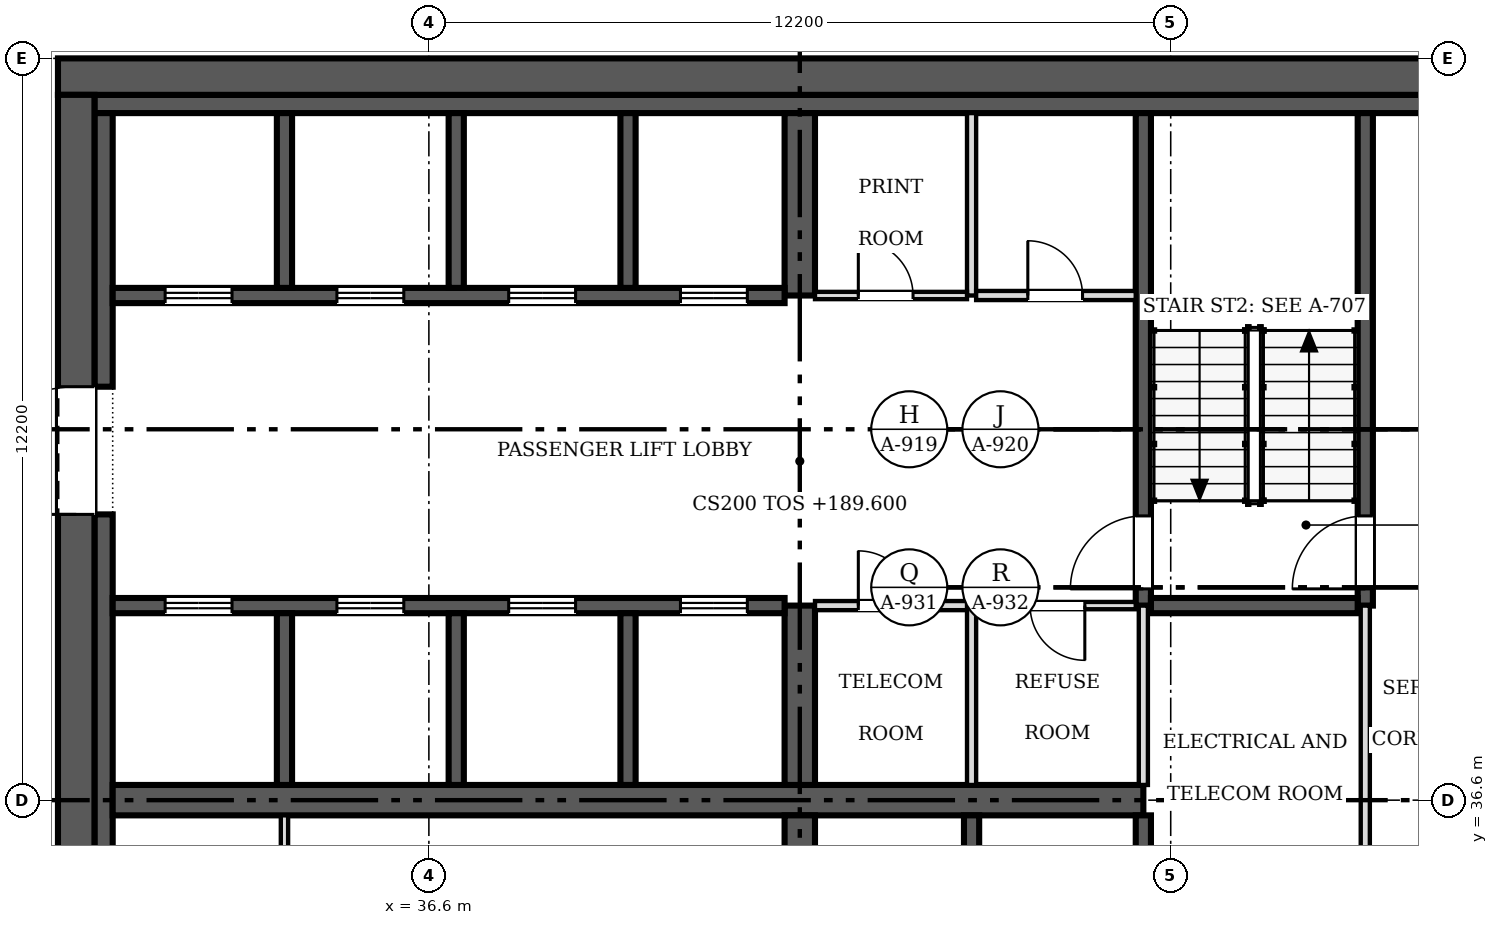
"""IFC4 building model, lengths in metres.
Left out: names, types, materials, properties, quantities, classifications, styles, units other than length and angle.
Written with IfcOpenShell. Run it as: python <this file> out.ifc"""

import sys

from ifc_helpers import new_model, si_unit, direction, frame, frame_2d, origin, place, context, subcontext, project, spatial, rectangle, extrude, source, transform, mapped, element, fill, save


model = new_model("IFC4")
c1 = context("Model", 3, precision=1e-05, world=origin(), true_north=direction((0.0, 1.0)))
c2 = subcontext(c1, "Body", "Model", "MODEL_VIEW")
j1 = project(units=[si_unit("LENGTHUNIT", "METRE"), si_unit("PLANEANGLEUNIT", "RADIAN")], contexts=[c1])
p1 = place(None, origin())
s1 = spatial("IfcSite", under=j1, at=p1, CompositionType="ELEMENT")
p2 = place(p1, origin())
s2 = spatial("IfcBuilding", under=s1, at=p2, CompositionType="ELEMENT")
p3 = place(p2, frame((0.0, 0.0, 189.6)))
s3 = spatial("IfcBuildingStorey", under=s2, at=p3, CompositionType="ELEMENT", Elevation=189.6)
p4 = place(p3, frame((30.8, 25.0, 0.0), z_axis=(0.0, 0.0, 1.0), x_axis=(0.0, 1.0, 0.0)))
e1 = element("IfcWall", 1, at=p4, inside=s3, PredefinedType="SHEAR", context=c2, shape_type="SweptSolid", body=[
    extrude(rectangle(XDim=23.2, YDim=0.6, at=frame_2d((11.6, 0.0))), origin(), (0.0, 0.0, 1.0), 3.8),
])
m1 = source(origin(), c2, "Body", "SweptSolid", [
    extrude(rectangle(XDim=2.1, YDim=2.4, at=frame_2d((1.05, 1.2))), frame((0.0, 0.31, 0.0), z_axis=(0.0, -1.0, 0.0), x_axis=(1.0, 0.0, 0.0)), (0.0, 0.0, 1.0), 0.62),
])
p5 = place(p4, frame((4.8, 0.0, 0.0)))
e2 = element("IfcOpeningElement", 2, at=p5, cuts=e1, PredefinedType="OPENING", context=c2, shape_type="MappedRepresentation", body=[
    mapped(m1, transform((0.0, 0.0, 0.0), scale=1.0)),
])
p6 = place(p4, frame((16.3, 0.0, 0.0)))
e3 = element("IfcOpeningElement", 3, at=p6, cuts=e1, PredefinedType="OPENING", context=c2, shape_type="MappedRepresentation", body=[
    mapped(m1, transform((0.0, 0.0, 0.0), scale=1.0)),
])
p7 = place(p3, frame((30.5, 48.5, 0.0), z_axis=(0.0, 0.0, 1.0), x_axis=(1.0, 0.0, 0.0)))
e4 = element("IfcWall", 4, at=p7, inside=s3, PredefinedType="SHEAR", context=c2, shape_type="SweptSolid", body=[
    extrude(rectangle(XDim=24.4, YDim=0.6, at=frame_2d((12.2, 0.0))), origin(), (0.0, 0.0, 1.0), 3.8),
])
p8 = place(p3, frame((31.1, 48.05, 0.0), z_axis=(0.0, 0.0, 1.0), x_axis=(1.0, 0.0, 0.0)))
e5 = element("IfcWall", 5, at=p8, inside=s3, PredefinedType="SOLIDWALL", context=c2, shape_type="SweptSolid", body=[
    extrude(rectangle(XDim=23.2, YDim=0.3, at=frame_2d((11.6, 0.0))), origin(), (0.0, 0.0, 1.0), 3.8),
])
p9 = place(p3, frame((31.25, 31.9, 0.0), z_axis=(0.0, 0.0, 1.0), x_axis=(0.0, 1.0, 0.0)))
e6 = element("IfcWall", 6, at=p9, inside=s3, PredefinedType="SOLIDWALL", context=c2, shape_type="SweptSolid", body=[
    extrude(rectangle(XDim=9.4, YDim=0.3, at=frame_2d((4.7, 0.0))), origin(), (0.0, 0.0, 1.0), 3.8),
])
p10 = place(p3, frame((31.25, 43.4, 0.0), z_axis=(0.0, 0.0, 1.0), x_axis=(0.0, 1.0, 0.0)))
e7 = element("IfcWall", 7, at=p10, inside=s3, PredefinedType="SOLIDWALL", context=c2, shape_type="SweptSolid", body=[
    extrude(rectangle(XDim=4.5, YDim=0.3, at=frame_2d((2.25, 0.0))), origin(), (0.0, 0.0, 1.0), 3.8),
])
p11 = place(p3, frame((31.4, 36.6, 0.0), z_axis=(0.0, 0.0, 1.0), x_axis=(1.0, 0.0, 0.0)))
e8 = element("IfcWall", 8, at=p11, inside=s3, PredefinedType="SHEAR", context=c2, shape_type="SweptSolid", body=[
    extrude(rectangle(XDim=16.95, YDim=0.5, at=frame_2d((8.475, 0.0))), origin(), (0.0, 0.0, 1.0), 3.8),
])
p12 = place(p3, frame((42.7, 36.35, 0.0), z_axis=(0.0, 0.0, 1.0), x_axis=(0.0, -1.0, 0.0)))
e9 = element("IfcWall", 9, at=p12, inside=s3, PredefinedType="SHEAR", context=c2, shape_type="SweptSolid", body=[
    extrude(rectangle(XDim=11.05, YDim=0.5, at=frame_2d((5.525, 0.0))), origin(), (0.0, 0.0, 1.0), 3.8),
])
m2 = source(origin(), c2, "Body", "SweptSolid", [
    extrude(rectangle(XDim=0.9, YDim=2.1, at=frame_2d((0.45, 1.05))), frame((0.0, 0.26, 0.0), z_axis=(0.0, -1.0, 0.0), x_axis=(1.0, 0.0, 0.0)), (0.0, 0.0, 1.0), 0.52),
])
p13 = place(p12, frame((6.5, 0.0, 0.0)))
e10 = element("IfcOpeningElement", 10, at=p13, cuts=e9, PredefinedType="OPENING", context=c2, shape_type="MappedRepresentation", body=[
    mapped(m2, transform((0.0, 0.0, 0.0), scale=1.0)),
])
m3 = source(origin(), c2, "Body", "SweptSolid", [
    extrude(rectangle(XDim=1.1, YDim=2.1, at=frame_2d((0.55, 1.05))), frame((0.0, 0.26, 0.0), z_axis=(0.0, -1.0, 0.0), x_axis=(1.0, 0.0, 0.0)), (0.0, 0.0, 1.0), 0.52),
])
p14 = place(p12, frame((3.8, 0.0, 0.0)))
e11 = element("IfcOpeningElement", 11, at=p14, cuts=e9, PredefinedType="OPENING", context=c2, shape_type="MappedRepresentation", body=[
    mapped(m3, transform((0.0, 0.0, 0.0), scale=1.0)),
])
p15 = place(p3, frame((42.7, 36.85, 0.0), z_axis=(0.0, 0.0, 1.0), x_axis=(0.0, 1.0, 0.0)))
e12 = element("IfcWall", 12, at=p15, inside=s3, PredefinedType="SHEAR", context=c2, shape_type="SweptSolid", body=[
    extrude(rectangle(XDim=2.95, YDim=0.5, at=frame_2d((1.475, 0.0))), origin(), (0.0, 0.0, 1.0), 3.8),
])
p16 = place(p3, frame((42.7, 44.9, 0.0), z_axis=(0.0, 0.0, 1.0), x_axis=(0.0, 1.0, 0.0)))
e13 = element("IfcWall", 13, at=p16, inside=s3, PredefinedType="SHEAR", context=c2, shape_type="SweptSolid", body=[
    extrude(rectangle(XDim=3.0, YDim=0.5, at=frame_2d((1.5, 0.0))), origin(), (0.0, 0.0, 1.0), 3.8),
])
p17 = place(p3, frame((31.4, 39.8, 0.0), z_axis=(0.0, 0.0, 1.0), x_axis=(1.0, 0.0, 0.0)))
e14 = element("IfcWall", 14, at=p17, inside=s3, PredefinedType="SOLIDWALL", context=c2, shape_type="SweptSolid", body=[
    extrude(rectangle(XDim=11.05, YDim=0.25, at=frame_2d((5.525, 0.0))), origin(), (0.0, 0.0, 1.0), 3.8),
])
m4 = source(origin(), c2, "Body", "SweptSolid", [
    extrude(rectangle(XDim=1.1, YDim=2.1, at=frame_2d((0.55, 1.05))), frame((0.0, 0.135, 0.0), z_axis=(0.0, -1.0, 0.0), x_axis=(1.0, 0.0, 0.0)), (0.0, 0.0, 1.0), 0.27),
])
p18 = place(p17, frame((0.863, 0.0, 0.0)))
e15 = element("IfcOpeningElement", 15, at=p18, cuts=e14, PredefinedType="OPENING", context=c2, shape_type="MappedRepresentation", body=[
    mapped(m4, transform((0.0, 0.0, 0.0), scale=1.0)),
])
p19 = place(p17, frame((3.688, 0.0, 0.0)))
e16 = element("IfcOpeningElement", 16, at=p19, cuts=e14, PredefinedType="OPENING", context=c2, shape_type="MappedRepresentation", body=[
    mapped(m4, transform((0.0, 0.0, 0.0), scale=1.0)),
])
p20 = place(p17, frame((6.512, 0.0, 0.0)))
e17 = element("IfcOpeningElement", 17, at=p20, cuts=e14, PredefinedType="OPENING", context=c2, shape_type="MappedRepresentation", body=[
    mapped(m4, transform((0.0, 0.0, 0.0), scale=1.0)),
])
p21 = place(p17, frame((9.337, 0.0, 0.0)))
e18 = element("IfcOpeningElement", 18, at=p21, cuts=e14, PredefinedType="OPENING", context=c2, shape_type="MappedRepresentation", body=[
    mapped(m4, transform((0.0, 0.0, 0.0), scale=1.0)),
])
p22 = place(p3, frame((42.45, 44.9, 0.0), z_axis=(0.0, 0.0, 1.0), x_axis=(-1.0, 0.0, 0.0)))
e19 = element("IfcWall", 19, at=p22, inside=s3, PredefinedType="SOLIDWALL", context=c2, shape_type="SweptSolid", body=[
    extrude(rectangle(XDim=11.05, YDim=0.25, at=frame_2d((5.525, 0.0))), origin(), (0.0, 0.0, 1.0), 3.8),
])
p23 = place(p22, frame((9.087, 0.0, 0.0)))
e20 = element("IfcOpeningElement", 20, at=p23, cuts=e19, PredefinedType="OPENING", context=c2, shape_type="MappedRepresentation", body=[
    mapped(m4, transform((0.0, 0.0, 0.0), scale=1.0)),
])
p24 = place(p22, frame((6.262, 0.0, 0.0)))
e21 = element("IfcOpeningElement", 21, at=p24, cuts=e19, PredefinedType="OPENING", context=c2, shape_type="MappedRepresentation", body=[
    mapped(m4, transform((0.0, 0.0, 0.0), scale=1.0)),
])
p25 = place(p22, frame((3.438, 0.0, 0.0)))
e22 = element("IfcOpeningElement", 22, at=p25, cuts=e19, PredefinedType="OPENING", context=c2, shape_type="MappedRepresentation", body=[
    mapped(m4, transform((0.0, 0.0, 0.0), scale=1.0)),
])
p26 = place(p22, frame((0.613, 0.0, 0.0)))
e23 = element("IfcOpeningElement", 23, at=p26, cuts=e19, PredefinedType="OPENING", context=c2, shape_type="MappedRepresentation", body=[
    mapped(m4, transform((0.0, 0.0, 0.0), scale=1.0)),
])
p27 = place(p3, frame((48.35, 36.35, 0.0), z_axis=(0.0, 0.0, 1.0), x_axis=(0.0, -1.0, 0.0)))
e24 = element("IfcWall", 24, at=p27, inside=s3, PredefinedType="SOLIDWALL", context=c2, shape_type="SweptSolid", body=[
    extrude(rectangle(XDim=11.05, YDim=0.25, at=frame_2d((5.525, 0.0))), origin(), (0.0, 0.0, 1.0), 3.8),
])
m5 = source(origin(), c2, "Body", "SweptSolid", [
    extrude(rectangle(XDim=1.2, YDim=2.1, at=frame_2d((0.6, 1.05))), frame((0.0, 0.135, 0.0), z_axis=(0.0, -1.0, 0.0), x_axis=(1.0, 0.0, 0.0)), (0.0, 0.0, 1.0), 0.27),
])
p28 = place(p27, frame((3.225, 0.0, 0.0)))
e25 = element("IfcOpeningElement", 25, at=p28, cuts=e24, PredefinedType="OPENING", context=c2, shape_type="MappedRepresentation", body=[
    mapped(m5, transform((0.0, 0.0, 0.0), scale=1.0)),
])
p29 = place(p3, frame((48.35, 47.9, 0.0), z_axis=(0.0, 0.0, 1.0), x_axis=(0.0, -1.0, 0.0)))
e26 = element("IfcWall", 26, at=p29, inside=s3, PredefinedType="SOLIDWALL", context=c2, shape_type="SweptSolid", body=[
    extrude(rectangle(XDim=8.1, YDim=0.25, at=frame_2d((4.05, 0.0))), origin(), (0.0, 0.0, 1.0), 3.8),
])
p30 = place(p29, frame((6.625, 0.0, 0.0)))
e27 = element("IfcOpeningElement", 27, at=p30, cuts=e26, PredefinedType="OPENING", context=c2, shape_type="MappedRepresentation", body=[
    mapped(m5, transform((0.0, 0.0, 0.0), scale=1.0)),
])
p31 = place(p3, frame((52.0, 39.8, 0.0), z_axis=(0.0, 0.0, 1.0), x_axis=(0.0, 1.0, 0.0)))
e28 = element("IfcWall", 28, at=p31, inside=s3, PredefinedType="SOLIDWALL", context=c2, shape_type="SweptSolid", body=[
    extrude(rectangle(XDim=8.1, YDim=0.25, at=frame_2d((4.05, 0.0))), origin(), (0.0, 0.0, 1.0), 3.8),
])
p32 = place(p31, frame((0.275, 0.0, 0.0)))
e29 = element("IfcOpeningElement", 29, at=p32, cuts=e28, PredefinedType="OPENING", context=c2, shape_type="MappedRepresentation", body=[
    mapped(m5, transform((0.0, 0.0, 0.0), scale=1.0)),
])
p33 = place(p3, frame((48.475, 39.8, 0.0), z_axis=(0.0, 0.0, 1.0), x_axis=(1.0, 0.0, 0.0)))
e30 = element("IfcWall", 30, at=p33, inside=s3, PredefinedType="SOLIDWALL", context=c2, shape_type="SweptSolid", body=[
    extrude(rectangle(XDim=3.4, YDim=0.25, at=frame_2d((1.7, 0.0))), origin(), (0.0, 0.0, 1.0), 3.8),
])
for number, where, z_axis, x_axis in (
    (31, (34.225, 36.85, 0.0), (0.0, 0.0, 1.0), (0.0, 1.0, 0.0)),
    (32, (37.05, 36.85, 0.0), (0.0, 0.0, 1.0), (0.0, 1.0, 0.0)),
    (33, (39.875, 36.85, 0.0), (0.0, 0.0, 1.0), (0.0, 1.0, 0.0)),
):
    element("IfcWall", number, at=place(p3, frame(where, z_axis=z_axis, x_axis=x_axis)), inside=s3, PredefinedType="SOLIDWALL", context=c2, shape_type="SweptSolid", body=[
        extrude(rectangle(XDim=2.825, YDim=0.25, at=frame_2d((1.413, 0.0))), origin(), (0.0, 0.0, 1.0), 3.8),
    ])
p34 = place(p3, frame((45.525, 33.525, 0.0), z_axis=(0.0, 0.0, 1.0), x_axis=(0.0, 1.0, 0.0)))
e34 = element("IfcWall", 34, at=p34, inside=s3, PredefinedType="SOLIDWALL", context=c2, shape_type="SweptSolid", body=[
    extrude(rectangle(XDim=2.825, YDim=0.25, at=frame_2d((1.413, 0.0))), origin(), (0.0, 0.0, 1.0), 3.8),
])
for number, where, z_axis, x_axis in (
    (35, (34.225, 45.025, 0.0), (0.0, 0.0, 1.0), (0.0, 1.0, 0.0)),
    (36, (37.05, 45.025, 0.0), (0.0, 0.0, 1.0), (0.0, 1.0, 0.0)),
    (37, (39.875, 45.025, 0.0), (0.0, 0.0, 1.0), (0.0, 1.0, 0.0)),
):
    element("IfcWall", number, at=place(p3, frame(where, z_axis=z_axis, x_axis=x_axis)), inside=s3, PredefinedType="SOLIDWALL", context=c2, shape_type="SweptSolid", body=[
        extrude(rectangle(XDim=2.875, YDim=0.25, at=frame_2d((1.438, 0.0))), origin(), (0.0, 0.0, 1.0), 3.8),
    ])
p35 = place(p3, frame((52.0, 33.525, 0.0), z_axis=(0.0, 0.0, 1.0), x_axis=(0.0, 1.0, 0.0)))
e38 = element("IfcWall", 38, at=p35, inside=s3, PredefinedType="PARTITIONING", context=c2, shape_type="SweptSolid", body=[
    extrude(rectangle(XDim=6.275, YDim=0.15, at=frame_2d((3.138, 0.0))), origin(), (0.0, 0.0, 1.0), 3.55),
])
m6 = source(origin(), c2, "Body", "SweptSolid", [
    extrude(rectangle(XDim=0.9, YDim=2.1, at=frame_2d((0.45, 1.05))), frame((0.0, 0.085, 0.0), z_axis=(0.0, -1.0, 0.0), x_axis=(1.0, 0.0, 0.0)), (0.0, 0.0, 1.0), 0.17),
])
p36 = place(p35, frame((1.025, 0.0, 0.0)))
e39 = element("IfcOpeningElement", 39, at=p36, cuts=e38, PredefinedType="OPENING", context=c2, shape_type="MappedRepresentation", body=[
    mapped(m6, transform((0.0, 0.0, 0.0), scale=1.0)),
])
for number, where, z_axis, x_axis in (
    (40, (45.525, 36.85, 0.0), (0.0, 0.0, 1.0), (0.0, 1.0, 0.0)),
    (41, (48.35, 36.85, 0.0), (0.0, 0.0, 1.0), (0.0, 1.0, 0.0)),
):
    element("IfcWall", number, at=place(p3, frame(where, z_axis=z_axis, x_axis=x_axis)), inside=s3, PredefinedType="PARTITIONING", context=c2, shape_type="SweptSolid", body=[
        extrude(rectangle(XDim=2.95, YDim=0.15, at=frame_2d((1.475, 0.0))), origin(), (0.0, 0.0, 1.0), 3.55),
    ])
p37 = place(p3, frame((34.225, 33.46, 0.0), z_axis=(0.0, 0.0, 1.0), x_axis=(0.0, 1.0, 0.0)))
e42 = element("IfcWall", 42, at=p37, inside=s3, PredefinedType="PARTITIONING", context=c2, shape_type="SweptSolid", body=[
    extrude(rectangle(XDim=2.89, YDim=0.12, at=frame_2d((1.445, 0.0))), origin(), (0.0, 0.0, 1.0), 3.55),
])
p38 = place(p3, frame((45.525, 44.9, 0.0), z_axis=(0.0, 0.0, 1.0), x_axis=(0.0, 1.0, 0.0)))
e43 = element("IfcWall", 43, at=p38, inside=s3, PredefinedType="PARTITIONING", context=c2, shape_type="SweptSolid", body=[
    extrude(rectangle(XDim=3.0, YDim=0.15, at=frame_2d((1.5, 0.0))), origin(), (0.0, 0.0, 1.0), 3.55),
])
p39 = place(p3, frame((45.45, 39.8, 0.0), z_axis=(0.0, 0.0, 1.0), x_axis=(-1.0, 0.0, 0.0)))
e44 = element("IfcWall", 44, at=p39, inside=s3, PredefinedType="PARTITIONING", context=c2, shape_type="SweptSolid", body=[
    extrude(rectangle(XDim=2.5, YDim=0.15, at=frame_2d((1.25, 0.0))), origin(), (0.0, 0.0, 1.0), 3.55),
])
p40 = place(p39, frame((0.887, 0.0, 0.0)))
e45 = element("IfcOpeningElement", 45, at=p40, cuts=e44, PredefinedType="OPENING", context=c2, shape_type="MappedRepresentation", body=[
    mapped(m6, transform((0.0, 0.0, 0.0), scale=1.0)),
])
p41 = place(p3, frame((48.225, 39.8, 0.0), z_axis=(0.0, 0.0, 1.0), x_axis=(-1.0, 0.0, 0.0)))
e46 = element("IfcWall", 46, at=p41, inside=s3, PredefinedType="PARTITIONING", context=c2, shape_type="SweptSolid", body=[
    extrude(rectangle(XDim=2.625, YDim=0.12, at=frame_2d((1.312, 0.0))), origin(), (0.0, 0.0, 1.0), 3.55),
])
m7 = source(origin(), c2, "Body", "SweptSolid", [
    extrude(rectangle(XDim=0.9, YDim=2.1, at=frame_2d((0.45, 1.05))), frame((0.0, 0.07, 0.0), z_axis=(0.0, -1.0, 0.0), x_axis=(1.0, 0.0, 0.0)), (0.0, 0.0, 1.0), 0.14),
])
p42 = place(p41, frame((0.837, 0.0, 0.0)))
e47 = element("IfcOpeningElement", 47, at=p42, cuts=e46, PredefinedType="OPENING", context=c2, shape_type="MappedRepresentation", body=[
    mapped(m7, transform((0.0, 0.0, 0.0), scale=1.0)),
])
p43 = place(p3, frame((42.95, 44.9, 0.0), z_axis=(0.0, 0.0, 1.0), x_axis=(1.0, 0.0, 0.0)))
e48 = element("IfcWall", 48, at=p43, inside=s3, PredefinedType="PARTITIONING", context=c2, shape_type="SweptSolid", body=[
    extrude(rectangle(XDim=2.5, YDim=0.12, at=frame_2d((1.25, 0.0))), origin(), (0.0, 0.0, 1.0), 3.55),
])
p44 = place(p43, frame((0.712, 0.0, 0.0)))
e49 = element("IfcOpeningElement", 49, at=p44, cuts=e48, PredefinedType="OPENING", context=c2, shape_type="MappedRepresentation", body=[
    mapped(m7, transform((0.0, 0.0, 0.0), scale=1.0)),
])
p45 = place(p3, frame((45.6, 44.9, 0.0), z_axis=(0.0, 0.0, 1.0), x_axis=(1.0, 0.0, 0.0)))
e50 = element("IfcWall", 50, at=p45, inside=s3, PredefinedType="PARTITIONING", context=c2, shape_type="SweptSolid", body=[
    extrude(rectangle(XDim=2.625, YDim=0.15, at=frame_2d((1.312, 0.0))), origin(), (0.0, 0.0, 1.0), 3.55),
])
p46 = place(p45, frame((0.85, 0.0, 0.0)))
e51 = element("IfcOpeningElement", 51, at=p46, cuts=e50, PredefinedType="OPENING", context=c2, shape_type="MappedRepresentation", body=[
    mapped(m6, transform((0.0, 0.0, 0.0), scale=1.0)),
])
m8 = source(origin(), c2, "Body", "SweptSolid", [
    extrude(rectangle(XDim=2.1, YDim=2.4, at=frame_2d((1.05, 1.2))), frame((0.0, 0.025, 0.0), z_axis=(0.0, -1.0, 0.0), x_axis=(1.0, 0.0, 0.0)), (0.0, 0.0, 1.0), 0.05),
])
p47 = place(p6, origin())
e52 = element("IfcDoor", 52, at=p47, inside=s3, OperationType="DOUBLE_DOOR_SINGLE_SWING", PredefinedType="DOOR", context=c2, shape_type="MappedRepresentation", body=[
    mapped(m8, transform((0.0, 0.0, 0.0), scale=1.0)),
])
fill(e3, e52)
m9 = source(origin(), c2, "Body", "SweptSolid", [
    extrude(rectangle(XDim=1.1, YDim=2.1, at=frame_2d((0.55, 1.05))), frame((0.0, 0.025, 0.0), z_axis=(0.0, -1.0, 0.0), x_axis=(1.0, 0.0, 0.0)), (0.0, 0.0, 1.0), 0.05),
])
p48 = place(p18, origin())
e53 = element("IfcDoor", 53, at=p48, inside=s3, OperationType="DOUBLE_DOOR_SLIDING", PredefinedType="DOOR", context=c2, shape_type="MappedRepresentation", body=[
    mapped(m9, transform((0.0, 0.0, 0.0), scale=1.0)),
])
fill(e15, e53)
p49 = place(p19, origin())
e54 = element("IfcDoor", 54, at=p49, inside=s3, OperationType="DOUBLE_DOOR_SLIDING", PredefinedType="DOOR", context=c2, shape_type="MappedRepresentation", body=[
    mapped(m9, transform((0.0, 0.0, 0.0), scale=1.0)),
])
fill(e16, e54)
p50 = place(p20, origin())
e55 = element("IfcDoor", 55, at=p50, inside=s3, OperationType="DOUBLE_DOOR_SLIDING", PredefinedType="DOOR", context=c2, shape_type="MappedRepresentation", body=[
    mapped(m9, transform((0.0, 0.0, 0.0), scale=1.0)),
])
fill(e17, e55)
p51 = place(p21, origin())
e56 = element("IfcDoor", 56, at=p51, inside=s3, OperationType="DOUBLE_DOOR_SLIDING", PredefinedType="DOOR", context=c2, shape_type="MappedRepresentation", body=[
    mapped(m9, transform((0.0, 0.0, 0.0), scale=1.0)),
])
fill(e18, e56)
p52 = place(p23, origin())
e57 = element("IfcDoor", 57, at=p52, inside=s3, OperationType="DOUBLE_DOOR_SLIDING", PredefinedType="DOOR", context=c2, shape_type="MappedRepresentation", body=[
    mapped(m9, transform((0.0, 0.0, 0.0), scale=1.0)),
])
fill(e20, e57)
p53 = place(p24, origin())
e58 = element("IfcDoor", 58, at=p53, inside=s3, OperationType="DOUBLE_DOOR_SLIDING", PredefinedType="DOOR", context=c2, shape_type="MappedRepresentation", body=[
    mapped(m9, transform((0.0, 0.0, 0.0), scale=1.0)),
])
fill(e21, e58)
p54 = place(p25, origin())
e59 = element("IfcDoor", 59, at=p54, inside=s3, OperationType="DOUBLE_DOOR_SLIDING", PredefinedType="DOOR", context=c2, shape_type="MappedRepresentation", body=[
    mapped(m9, transform((0.0, 0.0, 0.0), scale=1.0)),
])
fill(e22, e59)
p55 = place(p26, origin())
e60 = element("IfcDoor", 60, at=p55, inside=s3, OperationType="DOUBLE_DOOR_SLIDING", PredefinedType="DOOR", context=c2, shape_type="MappedRepresentation", body=[
    mapped(m9, transform((0.0, 0.0, 0.0), scale=1.0)),
])
fill(e23, e60)
m10 = source(origin(), c2, "Body", "SweptSolid", [
    extrude(rectangle(XDim=1.2, YDim=2.1, at=frame_2d((0.6, 1.05))), frame((0.0, 0.025, 0.0), z_axis=(0.0, -1.0, 0.0), x_axis=(1.0, 0.0, 0.0)), (0.0, 0.0, 1.0), 0.05),
])
p56 = place(p30, origin())
e61 = element("IfcDoor", 61, at=p56, inside=s3, OperationType="SINGLE_SWING_RIGHT", PredefinedType="DOOR", context=c2, shape_type="MappedRepresentation", body=[
    mapped(m10, transform((0.0, 0.0, 0.0), scale=1.0)),
])
fill(e27, e61)
p57 = place(p32, origin())
e62 = element("IfcDoor", 62, at=p57, inside=s3, OperationType="SINGLE_SWING_LEFT", PredefinedType="DOOR", context=c2, shape_type="MappedRepresentation", body=[
    mapped(m10, transform((0.0, 0.0, 0.0), scale=1.0)),
])
fill(e29, e62)
m11 = source(origin(), c2, "Body", "SweptSolid", [
    extrude(rectangle(XDim=0.9, YDim=2.1, at=frame_2d((0.45, 1.05))), frame((0.0, 0.025, 0.0), z_axis=(0.0, -1.0, 0.0), x_axis=(1.0, 0.0, 0.0)), (0.0, 0.0, 1.0), 0.05),
])
p58 = place(p40, origin())
e63 = element("IfcDoor", 63, at=p58, inside=s3, OperationType="SINGLE_SWING_RIGHT", PredefinedType="DOOR", context=c2, shape_type="MappedRepresentation", body=[
    mapped(m11, transform((0.0, 0.0, 0.0), scale=1.0)),
])
fill(e45, e63)
p59 = place(p42, origin())
e64 = element("IfcDoor", 64, at=p59, inside=s3, OperationType="SINGLE_SWING_LEFT", PredefinedType="DOOR", context=c2, shape_type="MappedRepresentation", body=[
    mapped(m11, transform((0.0, 0.0, 0.0), scale=1.0)),
])
fill(e47, e64)
p60 = place(p44, origin())
e65 = element("IfcDoor", 65, at=p60, inside=s3, OperationType="SINGLE_SWING_LEFT", PredefinedType="DOOR", context=c2, shape_type="MappedRepresentation", body=[
    mapped(m11, transform((0.0, 0.0, 0.0), scale=1.0)),
])
fill(e49, e65)
p61 = place(p46, origin())
e66 = element("IfcDoor", 66, at=p61, inside=s3, OperationType="SINGLE_SWING_LEFT", PredefinedType="DOOR", context=c2, shape_type="MappedRepresentation", body=[
    mapped(m11, transform((0.0, 0.0, 0.0), scale=1.0)),
])
fill(e51, e66)
save(model, sys.argv[1])
